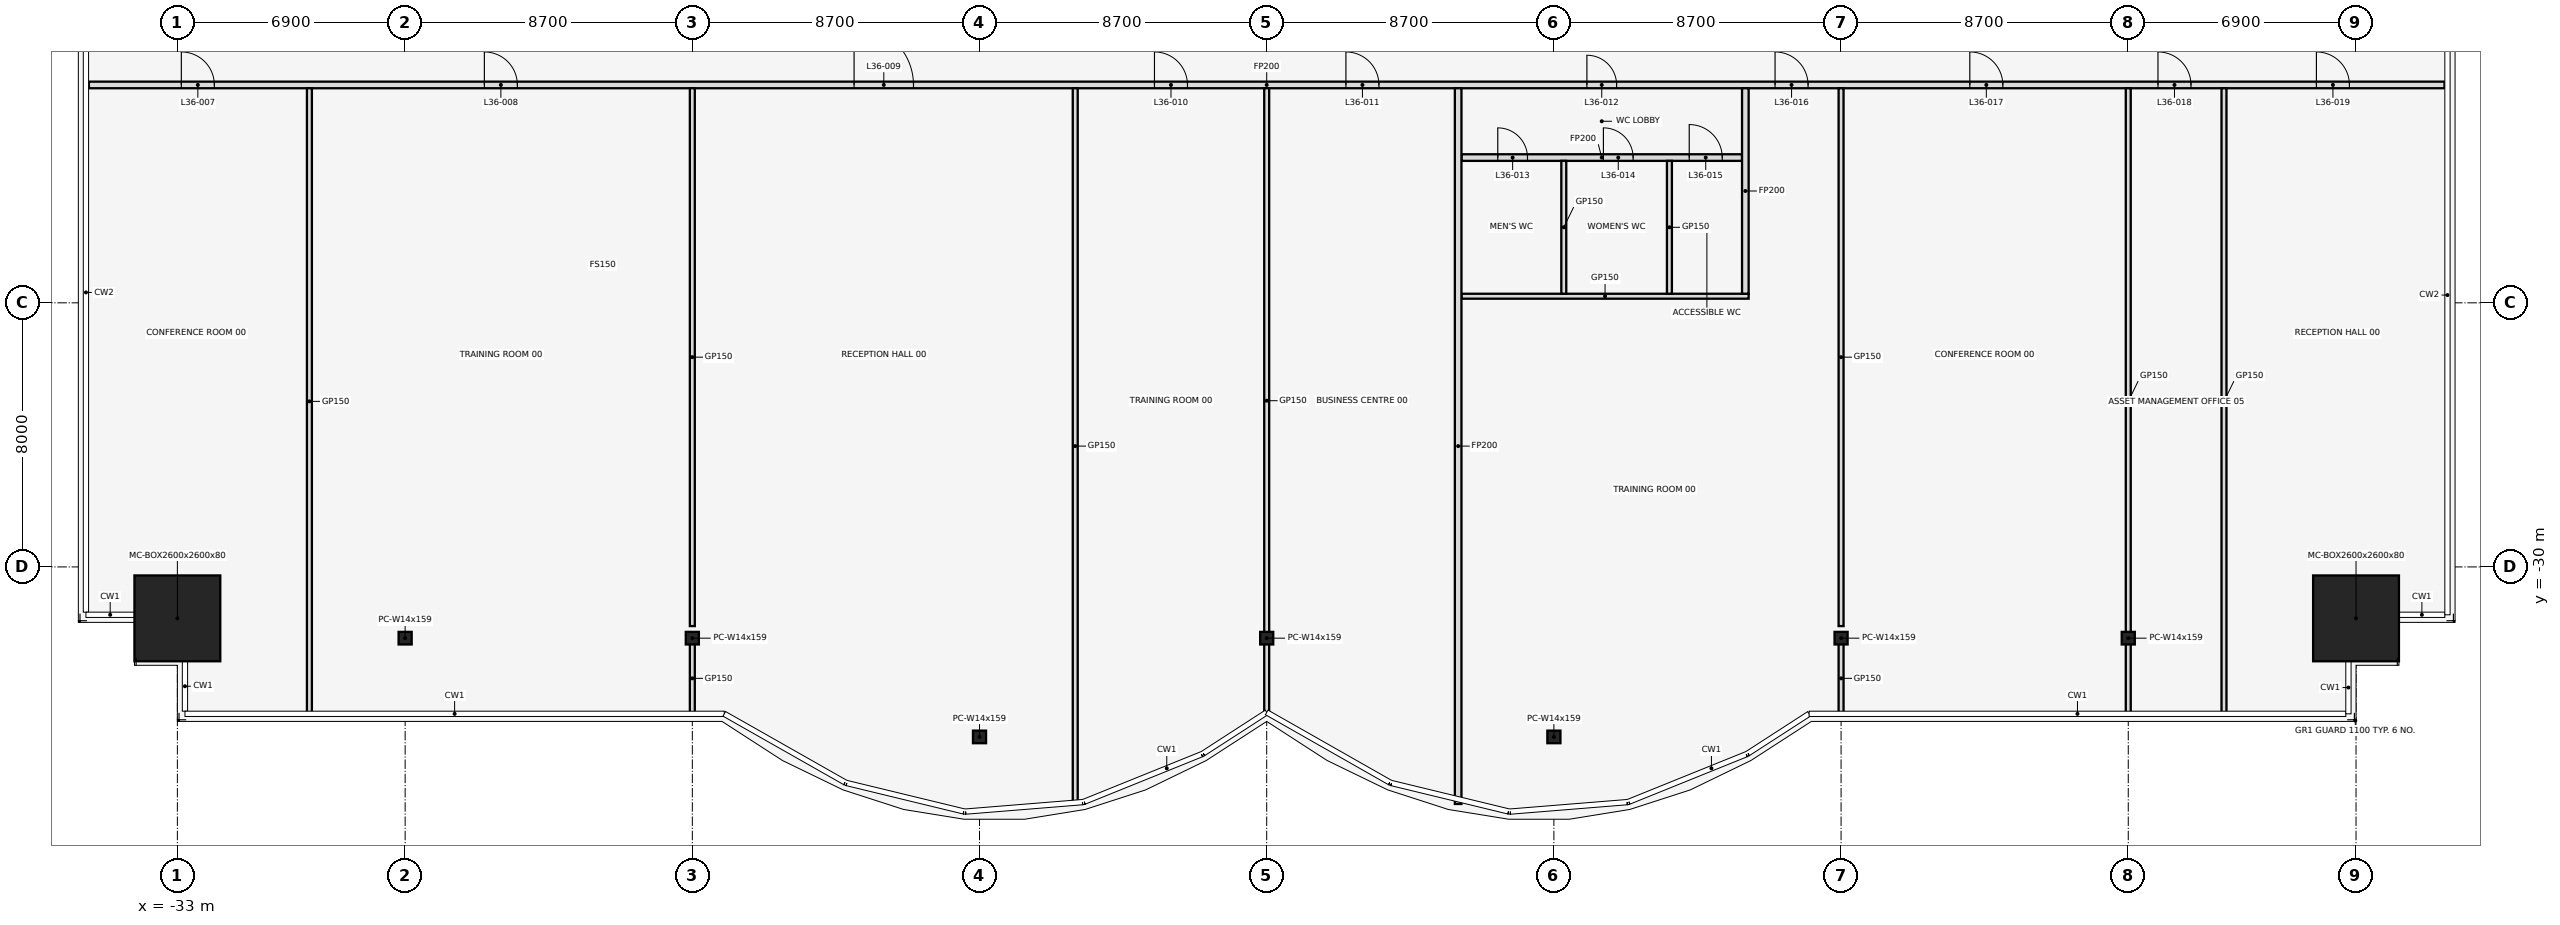
"""IFC4 building model, lengths in metres.
Left out: names, types, materials, properties, quantities, classifications, styles, units other than length and angle.
Written with IfcOpenShell. Run it as: python <this file> out.ifc"""

import sys

from ifc_helpers import new_model, si_unit, direction, frame, frame_2d, origin, origin_2d, place, context, subcontext, project, spatial, rectangle, hollow_rectangle, i_section, extrude, element, fill, save


model = new_model("IFC4")
c1 = context("Model", 3, precision=1e-05, world=origin(), true_north=direction((0.0, 1.0)))
c2 = subcontext(c1, "Body", "Model", "MODEL_VIEW")
j1 = project(units=[si_unit("LENGTHUNIT", "METRE"), si_unit("PLANEANGLEUNIT", "RADIAN")], contexts=[c1])
p1 = place(None, origin())
s1 = spatial("IfcSite", under=j1, at=p1, CompositionType="ELEMENT")
p2 = place(p1, origin())
s2 = spatial("IfcBuilding", under=s1, at=p2, CompositionType="ELEMENT")
p3 = place(p2, frame((0.0, 0.0, 165.0)))
s3 = spatial("IfcBuildingStorey", under=s2, at=p3, CompositionType="ELEMENT", Elevation=165.0)
p4 = place(p3, frame((-33.0, -31.558, 0.0), z_axis=(0.0, 0.0, 1.0), x_axis=(1.0, 0.0, 0.0)))
e1 = element("IfcColumn", 1, at=p4, inside=s3, PredefinedType="COLUMN", context=c2, shape_type="SweptSolid", body=[
    extrude(hollow_rectangle(XDim=2.6, YDim=2.6, WallThickness=0.08, at=origin_2d()), origin(), (0.0, 0.0, 1.0), 4.1),
])
for number, where, z_axis, x_axis in (
    (2, (-26.1, -32.158, 0.0), (0.0, 0.0, 1.0), (1.0, 0.0, 0.0)),
    (3, (-17.4, -32.158, 0.0), (0.0, 0.0, 1.0), (1.0, 0.0, 0.0)),
    (4, (-8.7, -35.149, 0.0), (0.0, 0.0, 1.0), (1.0, 0.0, 0.0)),
    (5, (0.0, -32.158, 0.0), (0.0, 0.0, 1.0), (1.0, 0.0, 0.0)),
    (6, (8.7, -35.149, 0.0), (0.0, 0.0, 1.0), (1.0, 0.0, 0.0)),
    (7, (17.4, -32.158, 0.0), (0.0, 0.0, 1.0), (1.0, 0.0, 0.0)),
    (8, (26.1, -32.158, 0.0), (0.0, 0.0, 1.0), (1.0, 0.0, 0.0)),
):
    element("IfcColumn", number, at=place(p3, frame(where, z_axis=z_axis, x_axis=x_axis)), inside=s3, PredefinedType="COLUMN", context=c2, shape_type="SweptSolid", body=[
        extrude(i_section(OverallWidth=0.396, OverallDepth=0.381, WebThickness=0.019, FlangeThickness=0.03, at=origin_2d()), origin(), (0.0, 0.0, 1.0), 4.1),
    ])
p5 = place(p3, frame((33.0, -31.558, 0.0), z_axis=(0.0, 0.0, 1.0), x_axis=(1.0, 0.0, 0.0)))
e9 = element("IfcColumn", 9, at=p5, inside=s3, PredefinedType="COLUMN", context=c2, shape_type="SweptSolid", body=[
    extrude(hollow_rectangle(XDim=2.6, YDim=2.6, WallThickness=0.08, at=origin_2d()), origin(), (0.0, 0.0, 1.0), 4.1),
])
p6 = place(p3, frame((5.9, -21.8, 0.0), z_axis=(0.0, 0.0, 1.0), x_axis=(1.0, 0.0, 0.0)))
e10 = element("IfcWall", 10, at=p6, inside=s3, PredefinedType="PARTITIONING", context=c2, shape_type="SweptSolid", body=[
    extrude(rectangle(XDim=8.7, YDim=0.15, at=frame_2d((4.35, 0.0))), origin(), (0.0, 0.0, 1.0), 2.84),
])
p7 = place(p3, frame((5.9, -17.6, 0.0), z_axis=(0.0, 0.0, 1.0), x_axis=(1.0, 0.0, 0.0)))
e11 = element("IfcWall", 11, at=p7, inside=s3, PredefinedType="PARTITIONING", context=c2, shape_type="SweptSolid", body=[
    extrude(rectangle(XDim=8.5, YDim=0.2, at=frame_2d((4.25, 0.0))), origin(), (0.0, 0.0, 1.0), 2.84),
])
p8 = place(p7, frame((1.1, 0.0, 0.0)))
e12 = element("IfcOpeningElement", 12, at=p8, cuts=e11, PredefinedType="OPENING", context=c2, shape_type="SweptSolid", body=[
    extrude(rectangle(XDim=0.9, YDim=2.1, at=frame_2d((0.45, 1.05))), frame((0.0, 0.112, 0.0), z_axis=(0.0, -1.0, 0.0), x_axis=(1.0, 0.0, 0.0)), (0.0, 0.0, 1.0), 0.224),
])
p9 = place(p7, frame((4.3, 0.0, 0.0)))
e13 = element("IfcOpeningElement", 13, at=p9, cuts=e11, PredefinedType="OPENING", context=c2, shape_type="SweptSolid", body=[
    extrude(rectangle(XDim=0.9, YDim=2.1, at=frame_2d((0.45, 1.05))), frame((0.0, 0.112, 0.0), z_axis=(0.0, -1.0, 0.0), x_axis=(1.0, 0.0, 0.0)), (0.0, 0.0, 1.0), 0.224),
])
p10 = place(p7, frame((6.9, 0.0, 0.0)))
e14 = element("IfcOpeningElement", 14, at=p10, cuts=e11, PredefinedType="OPENING", context=c2, shape_type="SweptSolid", body=[
    extrude(rectangle(XDim=1.0, YDim=2.1, at=frame_2d((0.5, 1.05))), frame((0.0, 0.112, 0.0), z_axis=(0.0, -1.0, 0.0), x_axis=(1.0, 0.0, 0.0)), (0.0, 0.0, 1.0), 0.224),
])
p11 = place(p3, frame((-35.68, -15.4, 0.0), z_axis=(0.0, 0.0, 1.0), x_axis=(1.0, 0.0, 0.0)))
e15 = element("IfcWall", 15, at=p11, inside=s3, PredefinedType="PARTITIONING", context=c2, shape_type="SweptSolid", body=[
    extrude(rectangle(XDim=71.36, YDim=0.2, at=frame_2d((35.68, 0.0))), origin(), (0.0, 0.0, 1.0), 2.84),
])
p12 = place(p11, frame((2.8, 0.0, 0.0)))
e16 = element("IfcOpeningElement", 16, at=p12, cuts=e15, PredefinedType="OPENING", context=c2, shape_type="SweptSolid", body=[
    extrude(rectangle(XDim=1.0, YDim=2.1, at=frame_2d((0.5, 1.05))), frame((0.0, 0.112, 0.0), z_axis=(0.0, -1.0, 0.0), x_axis=(1.0, 0.0, 0.0)), (0.0, 0.0, 1.0), 0.224),
])
p13 = place(p11, frame((11.98, 0.0, 0.0)))
e17 = element("IfcOpeningElement", 17, at=p13, cuts=e15, PredefinedType="OPENING", context=c2, shape_type="SweptSolid", body=[
    extrude(rectangle(XDim=1.0, YDim=2.1, at=frame_2d((0.5, 1.05))), frame((0.0, 0.112, 0.0), z_axis=(0.0, -1.0, 0.0), x_axis=(1.0, 0.0, 0.0)), (0.0, 0.0, 1.0), 0.224),
])
p14 = place(p11, frame((23.18, 0.0, 0.0)))
e18 = element("IfcOpeningElement", 18, at=p14, cuts=e15, PredefinedType="OPENING", context=c2, shape_type="SweptSolid", body=[
    extrude(rectangle(XDim=1.8, YDim=2.1, at=frame_2d((0.9, 1.05))), frame((0.0, 0.112, 0.0), z_axis=(0.0, -1.0, 0.0), x_axis=(1.0, 0.0, 0.0)), (0.0, 0.0, 1.0), 0.224),
])
p15 = place(p11, frame((32.28, 0.0, 0.0)))
e19 = element("IfcOpeningElement", 19, at=p15, cuts=e15, PredefinedType="OPENING", context=c2, shape_type="SweptSolid", body=[
    extrude(rectangle(XDim=1.0, YDim=2.1, at=frame_2d((0.5, 1.05))), frame((0.0, 0.112, 0.0), z_axis=(0.0, -1.0, 0.0), x_axis=(1.0, 0.0, 0.0)), (0.0, 0.0, 1.0), 0.224),
])
p16 = place(p11, frame((38.08, 0.0, 0.0)))
e20 = element("IfcOpeningElement", 20, at=p16, cuts=e15, PredefinedType="OPENING", context=c2, shape_type="SweptSolid", body=[
    extrude(rectangle(XDim=1.0, YDim=2.1, at=frame_2d((0.5, 1.05))), frame((0.0, 0.112, 0.0), z_axis=(0.0, -1.0, 0.0), x_axis=(1.0, 0.0, 0.0)), (0.0, 0.0, 1.0), 0.224),
])
p17 = place(p11, frame((45.38, 0.0, 0.0)))
e21 = element("IfcOpeningElement", 21, at=p17, cuts=e15, PredefinedType="OPENING", context=c2, shape_type="SweptSolid", body=[
    extrude(rectangle(XDim=0.9, YDim=2.1, at=frame_2d((0.45, 1.05))), frame((0.0, 0.112, 0.0), z_axis=(0.0, -1.0, 0.0), x_axis=(1.0, 0.0, 0.0)), (0.0, 0.0, 1.0), 0.224),
])
p18 = place(p11, frame((51.08, 0.0, 0.0)))
e22 = element("IfcOpeningElement", 22, at=p18, cuts=e15, PredefinedType="OPENING", context=c2, shape_type="SweptSolid", body=[
    extrude(rectangle(XDim=1.0, YDim=2.1, at=frame_2d((0.5, 1.05))), frame((0.0, 0.112, 0.0), z_axis=(0.0, -1.0, 0.0), x_axis=(1.0, 0.0, 0.0)), (0.0, 0.0, 1.0), 0.224),
])
p19 = place(p11, frame((56.98, 0.0, 0.0)))
e23 = element("IfcOpeningElement", 23, at=p19, cuts=e15, PredefinedType="OPENING", context=c2, shape_type="SweptSolid", body=[
    extrude(rectangle(XDim=1.0, YDim=2.1, at=frame_2d((0.5, 1.05))), frame((0.0, 0.112, 0.0), z_axis=(0.0, -1.0, 0.0), x_axis=(1.0, 0.0, 0.0)), (0.0, 0.0, 1.0), 0.224),
])
p20 = place(p11, frame((62.68, 0.0, 0.0)))
e24 = element("IfcOpeningElement", 24, at=p20, cuts=e15, PredefinedType="OPENING", context=c2, shape_type="SweptSolid", body=[
    extrude(rectangle(XDim=1.0, YDim=2.1, at=frame_2d((0.5, 1.05))), frame((0.0, 0.112, 0.0), z_axis=(0.0, -1.0, 0.0), x_axis=(1.0, 0.0, 0.0)), (0.0, 0.0, 1.0), 0.224),
])
p21 = place(p11, frame((67.48, 0.0, 0.0)))
e25 = element("IfcOpeningElement", 25, at=p21, cuts=e15, PredefinedType="OPENING", context=c2, shape_type="SweptSolid", body=[
    extrude(rectangle(XDim=1.0, YDim=2.1, at=frame_2d((0.5, 1.05))), frame((0.0, 0.112, 0.0), z_axis=(0.0, -1.0, 0.0), x_axis=(1.0, 0.0, 0.0)), (0.0, 0.0, 1.0), 0.224),
])
p22 = place(p3, frame((-29.0, -34.47, 0.0), z_axis=(0.0, 0.0, 1.0), x_axis=(0.0, 1.0, 0.0)))
e26 = element("IfcWall", 26, at=p22, inside=s3, PredefinedType="PARTITIONING", context=c2, shape_type="SweptSolid", body=[
    extrude(rectangle(XDim=18.97, YDim=0.15, at=frame_2d((9.485, 0.0))), origin(), (0.0, 0.0, 1.0), 2.84),
])
p23 = place(p3, frame((-17.4, -34.47, 0.0), z_axis=(0.0, 0.0, 1.0), x_axis=(0.0, 1.0, 0.0)))
e27 = element("IfcWall", 27, at=p23, inside=s3, PredefinedType="PARTITIONING", context=c2, shape_type="SweptSolid", body=[
    extrude(rectangle(XDim=2.19, YDim=0.15, at=frame_2d((1.095, 0.0))), origin(), (0.0, 0.0, 1.0), 2.84),
])
p24 = place(p3, frame((-17.4, -31.792, 0.0), z_axis=(0.0, 0.0, 1.0), x_axis=(0.0, 1.0, 0.0)))
e28 = element("IfcWall", 28, at=p24, inside=s3, PredefinedType="PARTITIONING", context=c2, shape_type="SweptSolid", body=[
    extrude(rectangle(XDim=16.292, YDim=0.15, at=frame_2d((8.146, 0.0))), origin(), (0.0, 0.0, 1.0), 2.84),
])
p25 = place(p3, frame((-5.8, -37.18, 0.0), z_axis=(0.0, 0.0, 1.0), x_axis=(0.0, 1.0, 0.0)))
e29 = element("IfcWall", 29, at=p25, inside=s3, PredefinedType="PARTITIONING", context=c2, shape_type="SweptSolid", body=[
    extrude(rectangle(XDim=21.68, YDim=0.15, at=frame_2d((10.84, 0.0))), origin(), (0.0, 0.0, 1.0), 2.84),
])
p26 = place(p3, frame((0.0, -34.43, 0.0), z_axis=(0.0, 0.0, 1.0), x_axis=(0.0, 1.0, 0.0)))
e30 = element("IfcWall", 30, at=p26, inside=s3, PredefinedType="PARTITIONING", context=c2, shape_type="SweptSolid", body=[
    extrude(rectangle(XDim=18.93, YDim=0.15, at=frame_2d((9.465, 0.0))), origin(), (0.0, 0.0, 1.0), 2.84),
])
p27 = place(p3, frame((5.8, -37.18, 0.0), z_axis=(0.0, 0.0, 1.0), x_axis=(0.0, 1.0, 0.0)))
e31 = element("IfcWall", 31, at=p27, inside=s3, PredefinedType="PARTITIONING", context=c2, shape_type="SweptSolid", body=[
    extrude(rectangle(XDim=21.68, YDim=0.2, at=frame_2d((10.84, 0.0))), origin(), (0.0, 0.0, 1.0), 2.84),
])
for number, where, z_axis, x_axis in (
    (32, (9.0, -21.725, 0.0), (0.0, 0.0, 1.0), (0.0, 1.0, 0.0)),
    (33, (12.2, -21.725, 0.0), (0.0, 0.0, 1.0), (0.0, 1.0, 0.0)),
):
    element("IfcWall", number, at=place(p3, frame(where, z_axis=z_axis, x_axis=x_axis)), inside=s3, PredefinedType="PARTITIONING", context=c2, shape_type="SweptSolid", body=[
        extrude(rectangle(XDim=4.025, YDim=0.15, at=frame_2d((2.013, 0.0))), origin(), (0.0, 0.0, 1.0), 2.84),
    ])
p28 = place(p3, frame((14.5, -21.725, 0.0), z_axis=(0.0, 0.0, 1.0), x_axis=(0.0, 1.0, 0.0)))
e34 = element("IfcWall", 34, at=p28, inside=s3, PredefinedType="PARTITIONING", context=c2, shape_type="SweptSolid", body=[
    extrude(rectangle(XDim=6.225, YDim=0.2, at=frame_2d((3.113, 0.0))), origin(), (0.0, 0.0, 1.0), 2.84),
])
p29 = place(p3, frame((17.4, -34.47, 0.0), z_axis=(0.0, 0.0, 1.0), x_axis=(0.0, 1.0, 0.0)))
e35 = element("IfcWall", 35, at=p29, inside=s3, PredefinedType="PARTITIONING", context=c2, shape_type="SweptSolid", body=[
    extrude(rectangle(XDim=2.19, YDim=0.15, at=frame_2d((1.095, 0.0))), origin(), (0.0, 0.0, 1.0), 2.84),
])
p30 = place(p3, frame((17.4, -31.792, 0.0), z_axis=(0.0, 0.0, 1.0), x_axis=(0.0, 1.0, 0.0)))
e36 = element("IfcWall", 36, at=p30, inside=s3, PredefinedType="PARTITIONING", context=c2, shape_type="SweptSolid", body=[
    extrude(rectangle(XDim=16.292, YDim=0.15, at=frame_2d((8.146, 0.0))), origin(), (0.0, 0.0, 1.0), 2.84),
])
for number, where, z_axis, x_axis in (
    (37, (26.1, -34.47, 0.0), (0.0, 0.0, 1.0), (0.0, 1.0, 0.0)),
    (38, (29.0, -34.47, 0.0), (0.0, 0.0, 1.0), (0.0, 1.0, 0.0)),
):
    element("IfcWall", number, at=place(p3, frame(where, z_axis=z_axis, x_axis=x_axis)), inside=s3, PredefinedType="PARTITIONING", context=c2, shape_type="SweptSolid", body=[
        extrude(rectangle(XDim=18.97, YDim=0.15, at=frame_2d((9.485, 0.0))), origin(), (0.0, 0.0, 1.0), 2.84),
    ])
p31 = place(p12, frame((1.0, 0.0, 0.0), z_axis=(0.0, 0.0, 1.0), x_axis=(-1.0, 0.0, 0.0)))
e39 = element("IfcDoor", 39, at=p31, inside=s3, OperationType="SINGLE_SWING_LEFT", PredefinedType="DOOR", context=c2, shape_type="SweptSolid", body=[
    extrude(rectangle(XDim=1.0, YDim=2.1, at=frame_2d((0.5, 1.05))), frame((0.0, 0.025, 0.0), z_axis=(0.0, -1.0, 0.0), x_axis=(1.0, 0.0, 0.0)), (0.0, 0.0, 1.0), 0.05),
])
fill(e16, e39)
p32 = place(p13, frame((1.0, 0.0, 0.0), z_axis=(0.0, 0.0, 1.0), x_axis=(-1.0, 0.0, 0.0)))
e40 = element("IfcDoor", 40, at=p32, inside=s3, OperationType="SINGLE_SWING_RIGHT", PredefinedType="DOOR", context=c2, shape_type="SweptSolid", body=[
    extrude(rectangle(XDim=1.0, YDim=2.1, at=frame_2d((0.5, 1.05))), frame((0.0, 0.025, 0.0), z_axis=(0.0, -1.0, 0.0), x_axis=(1.0, 0.0, 0.0)), (0.0, 0.0, 1.0), 0.05),
])
fill(e17, e40)
p33 = place(p14, origin())
e41 = element("IfcDoor", 41, at=p33, inside=s3, OperationType="SINGLE_SWING_LEFT", PredefinedType="DOOR", context=c2, shape_type="SweptSolid", body=[
    extrude(rectangle(XDim=1.8, YDim=2.1, at=frame_2d((0.9, 1.05))), frame((0.0, 0.025, 0.0), z_axis=(0.0, -1.0, 0.0), x_axis=(1.0, 0.0, 0.0)), (0.0, 0.0, 1.0), 0.05),
])
fill(e18, e41)
p34 = place(p15, frame((1.0, 0.0, 0.0), z_axis=(0.0, 0.0, 1.0), x_axis=(-1.0, 0.0, 0.0)))
e42 = element("IfcDoor", 42, at=p34, inside=s3, OperationType="SINGLE_SWING_LEFT", PredefinedType="DOOR", context=c2, shape_type="SweptSolid", body=[
    extrude(rectangle(XDim=1.0, YDim=2.1, at=frame_2d((0.5, 1.05))), frame((0.0, 0.025, 0.0), z_axis=(0.0, -1.0, 0.0), x_axis=(1.0, 0.0, 0.0)), (0.0, 0.0, 1.0), 0.05),
])
fill(e19, e42)
p35 = place(p16, frame((1.0, 0.0, 0.0), z_axis=(0.0, 0.0, 1.0), x_axis=(-1.0, 0.0, 0.0)))
e43 = element("IfcDoor", 43, at=p35, inside=s3, OperationType="SINGLE_SWING_RIGHT", PredefinedType="DOOR", context=c2, shape_type="SweptSolid", body=[
    extrude(rectangle(XDim=1.0, YDim=2.1, at=frame_2d((0.5, 1.05))), frame((0.0, 0.025, 0.0), z_axis=(0.0, -1.0, 0.0), x_axis=(1.0, 0.0, 0.0)), (0.0, 0.0, 1.0), 0.05),
])
fill(e20, e43)
p36 = place(p17, frame((0.9, 0.0, 0.0), z_axis=(0.0, 0.0, 1.0), x_axis=(-1.0, 0.0, 0.0)))
e44 = element("IfcDoor", 44, at=p36, inside=s3, OperationType="SINGLE_SWING_RIGHT", PredefinedType="DOOR", context=c2, shape_type="SweptSolid", body=[
    extrude(rectangle(XDim=0.9, YDim=2.1, at=frame_2d((0.45, 1.05))), frame((0.0, 0.025, 0.0), z_axis=(0.0, -1.0, 0.0), x_axis=(1.0, 0.0, 0.0)), (0.0, 0.0, 1.0), 0.05),
])
fill(e21, e44)
p37 = place(p8, frame((0.9, 0.0, 0.0), z_axis=(0.0, 0.0, 1.0), x_axis=(-1.0, 0.0, 0.0)))
e45 = element("IfcDoor", 45, at=p37, inside=s3, OperationType="SINGLE_SWING_LEFT", PredefinedType="DOOR", context=c2, shape_type="SweptSolid", body=[
    extrude(rectangle(XDim=0.9, YDim=2.1, at=frame_2d((0.45, 1.05))), frame((0.0, 0.025, 0.0), z_axis=(0.0, -1.0, 0.0), x_axis=(1.0, 0.0, 0.0)), (0.0, 0.0, 1.0), 0.05),
])
fill(e12, e45)
p38 = place(p9, frame((0.9, 0.0, 0.0), z_axis=(0.0, 0.0, 1.0), x_axis=(-1.0, 0.0, 0.0)))
e46 = element("IfcDoor", 46, at=p38, inside=s3, OperationType="SINGLE_SWING_RIGHT", PredefinedType="DOOR", context=c2, shape_type="SweptSolid", body=[
    extrude(rectangle(XDim=0.9, YDim=2.1, at=frame_2d((0.45, 1.05))), frame((0.0, 0.025, 0.0), z_axis=(0.0, -1.0, 0.0), x_axis=(1.0, 0.0, 0.0)), (0.0, 0.0, 1.0), 0.05),
])
fill(e13, e46)
p39 = place(p10, frame((1.0, 0.0, 0.0), z_axis=(0.0, 0.0, 1.0), x_axis=(-1.0, 0.0, 0.0)))
e47 = element("IfcDoor", 47, at=p39, inside=s3, OperationType="SINGLE_SWING_RIGHT", PredefinedType="DOOR", context=c2, shape_type="SweptSolid", body=[
    extrude(rectangle(XDim=1.0, YDim=2.1, at=frame_2d((0.5, 1.05))), frame((0.0, 0.025, 0.0), z_axis=(0.0, -1.0, 0.0), x_axis=(1.0, 0.0, 0.0)), (0.0, 0.0, 1.0), 0.05),
])
fill(e14, e47)
p40 = place(p18, frame((1.0, 0.0, 0.0), z_axis=(0.0, 0.0, 1.0), x_axis=(-1.0, 0.0, 0.0)))
e48 = element("IfcDoor", 48, at=p40, inside=s3, OperationType="SINGLE_SWING_LEFT", PredefinedType="DOOR", context=c2, shape_type="SweptSolid", body=[
    extrude(rectangle(XDim=1.0, YDim=2.1, at=frame_2d((0.5, 1.05))), frame((0.0, 0.025, 0.0), z_axis=(0.0, -1.0, 0.0), x_axis=(1.0, 0.0, 0.0)), (0.0, 0.0, 1.0), 0.05),
])
fill(e22, e48)
p41 = place(p19, frame((1.0, 0.0, 0.0), z_axis=(0.0, 0.0, 1.0), x_axis=(-1.0, 0.0, 0.0)))
e49 = element("IfcDoor", 49, at=p41, inside=s3, OperationType="SINGLE_SWING_RIGHT", PredefinedType="DOOR", context=c2, shape_type="SweptSolid", body=[
    extrude(rectangle(XDim=1.0, YDim=2.1, at=frame_2d((0.5, 1.05))), frame((0.0, 0.025, 0.0), z_axis=(0.0, -1.0, 0.0), x_axis=(1.0, 0.0, 0.0)), (0.0, 0.0, 1.0), 0.05),
])
fill(e23, e49)
p42 = place(p20, frame((1.0, 0.0, 0.0), z_axis=(0.0, 0.0, 1.0), x_axis=(-1.0, 0.0, 0.0)))
e50 = element("IfcDoor", 50, at=p42, inside=s3, OperationType="SINGLE_SWING_RIGHT", PredefinedType="DOOR", context=c2, shape_type="SweptSolid", body=[
    extrude(rectangle(XDim=1.0, YDim=2.1, at=frame_2d((0.5, 1.05))), frame((0.0, 0.025, 0.0), z_axis=(0.0, -1.0, 0.0), x_axis=(1.0, 0.0, 0.0)), (0.0, 0.0, 1.0), 0.05),
])
fill(e24, e50)
p43 = place(p21, frame((1.0, 0.0, 0.0), z_axis=(0.0, 0.0, 1.0), x_axis=(-1.0, 0.0, 0.0)))
e51 = element("IfcDoor", 51, at=p43, inside=s3, OperationType="SINGLE_SWING_LEFT", PredefinedType="DOOR", context=c2, shape_type="SweptSolid", body=[
    extrude(rectangle(XDim=1.0, YDim=2.1, at=frame_2d((0.5, 1.05))), frame((0.0, 0.025, 0.0), z_axis=(0.0, -1.0, 0.0), x_axis=(1.0, 0.0, 0.0)), (0.0, 0.0, 1.0), 0.05),
])
fill(e25, e51)
save(model, sys.argv[1])
